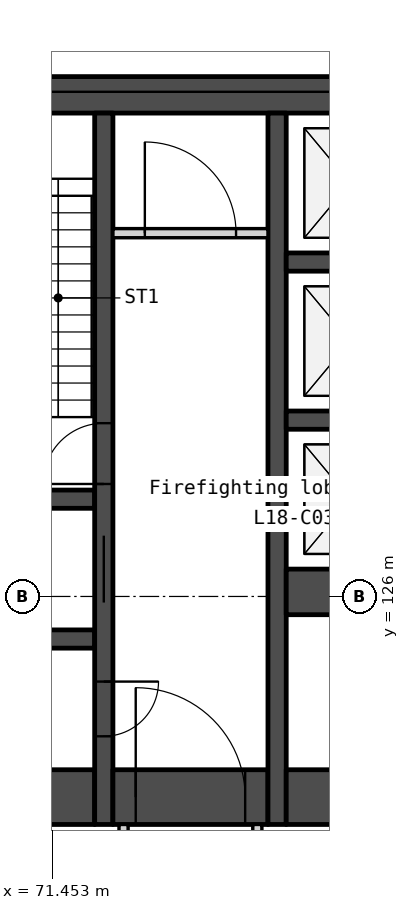
"""IFC4 building model, lengths in metres.
Left out: names, types, materials, properties, quantities, classifications, styles, units other than length and angle.
Written with IfcOpenShell. Run it as: python <this file> out.ifc"""

import sys

from ifc_helpers import new_model, si_unit, direction, frame, frame_2d, origin, place, context, subcontext, project, spatial, rectangle, extrude, element, fill, save


model = new_model("IFC4")
c1 = context("Model", 3, precision=1e-05, world=origin(), true_north=direction((0.0, 1.0)))
c2 = subcontext(c1, "Body", "Model", "MODEL_VIEW")
j1 = project(units=[si_unit("LENGTHUNIT", "METRE"), si_unit("PLANEANGLEUNIT", "RADIAN")], contexts=[c1])
p1 = place(None, origin())
s1 = spatial("IfcSite", under=j1, at=p1, CompositionType="ELEMENT")
p2 = place(p1, origin())
s2 = spatial("IfcBuilding", under=s1, at=p2, CompositionType="ELEMENT")
p3 = place(p2, frame((0.0, 0.0, 77.0)))
s3 = spatial("IfcBuildingStorey", under=s2, at=p3, CompositionType="ELEMENT", Elevation=77.0)
p4 = place(p3, frame((66.0, 134.25, 0.0), z_axis=(0.0, 0.0, 1.0), x_axis=(1.0, 0.0, 0.0)))
e1 = element("IfcWall", 1, at=p4, inside=s3, PredefinedType="SOLIDWALL", context=c2, shape_type="SweptSolid", body=[
    extrude(rectangle(XDim=28.0, YDim=0.6, at=frame_2d((14.0, 0.0))), origin(), (0.0, 0.0, 1.0), 4.35),
])
for number, where, z_axis, x_axis in (
    (2, (69.6, 127.6, 0.0), (0.0, 0.0, 1.0), (1.0, 0.0, 0.0)),
    (3, (69.6, 125.3, 0.0), (0.0, 0.0, 1.0), (1.0, 0.0, 0.0)),
):
    element("IfcWall", number, at=place(p3, frame(where, z_axis=z_axis, x_axis=x_axis)), inside=s3, PredefinedType="SOLIDWALL", context=c2, shape_type="SweptSolid", body=[
        extrude(rectangle(XDim=2.55, YDim=0.3, at=frame_2d((1.275, 0.0))), origin(), (0.0, 0.0, 1.0), 4.35),
    ])
p5 = place(p3, frame((69.6, 122.7, 0.0), z_axis=(0.0, 0.0, 1.0), x_axis=(1.0, 0.0, 0.0)))
e4 = element("IfcWall", 4, at=p5, inside=s3, PredefinedType="SOLIDWALL", context=c2, shape_type="SweptSolid", body=[
    extrude(rectangle(XDim=2.55, YDim=0.9, at=frame_2d((1.275, 0.0))), origin(), (0.0, 0.0, 1.0), 4.35),
])
p6 = place(p3, frame((72.3, 133.95, 0.0), z_axis=(0.0, 0.0, 1.0), x_axis=(0.0, -1.0, 0.0)))
e5 = element("IfcWall", 5, at=p6, inside=s3, PredefinedType="SOLIDWALL", context=c2, shape_type="SweptSolid", body=[
    extrude(rectangle(XDim=11.7, YDim=0.3, at=frame_2d((5.85, 0.0))), origin(), (0.0, 0.0, 1.0), 4.35),
])
p7 = place(p6, frame((6.95, 0.0, 0.0)))
e6 = element("IfcOpeningElement", 6, at=p7, cuts=e5, PredefinedType="OPENING", context=c2, shape_type="SweptSolid", body=[
    extrude(rectangle(XDim=1.1, YDim=2.1, at=frame_2d((0.55, 1.05))), frame((0.0, 0.16, 0.0), z_axis=(0.0, -1.0, 0.0), x_axis=(1.0, 0.0, 0.0)), (0.0, 0.0, 1.0), 0.32),
])
p8 = place(p6, frame((9.35, 0.0, 0.0)))
e7 = element("IfcOpeningElement", 7, at=p8, cuts=e5, PredefinedType="OPENING", context=c2, shape_type="SweptSolid", body=[
    extrude(rectangle(XDim=0.9, YDim=2.1, at=frame_2d((0.45, 1.05))), frame((0.0, 0.16, 0.0), z_axis=(0.0, -1.0, 0.0), x_axis=(1.0, 0.0, 0.0)), (0.0, 0.0, 1.0), 0.32),
])
p9 = place(p6, frame((5.1, 0.0, 0.0)))
e8 = element("IfcOpeningElement", 8, at=p9, cuts=e5, PredefinedType="OPENING", context=c2, shape_type="SweptSolid", body=[
    extrude(rectangle(XDim=1.0, YDim=2.1, at=frame_2d((0.5, 1.05))), frame((0.0, 0.16, 0.0), z_axis=(0.0, -1.0, 0.0), x_axis=(1.0, 0.0, 0.0)), (0.0, 0.0, 1.0), 0.32),
])
p10 = place(p3, frame((72.45, 131.975, 0.0), z_axis=(0.0, 0.0, 1.0), x_axis=(1.0, 0.0, 0.0)))
e9 = element("IfcWall", 9, at=p10, inside=s3, PredefinedType="PARTITIONING", context=c2, shape_type="SweptSolid", body=[
    extrude(rectangle(XDim=2.55, YDim=0.15, at=frame_2d((1.275, 0.0))), origin(), (0.0, 0.0, 1.0), 4.35),
])
p11 = place(p10, frame((0.525, 0.0, 0.0)))
e10 = element("IfcOpeningElement", 10, at=p11, cuts=e9, PredefinedType="OPENING", context=c2, shape_type="SweptSolid", body=[
    extrude(rectangle(XDim=1.5, YDim=2.1, at=frame_2d((0.75, 1.05))), frame((0.0, 0.085, 0.0), z_axis=(0.0, -1.0, 0.0), x_axis=(1.0, 0.0, 0.0)), (0.0, 0.0, 1.0), 0.17),
])
p12 = place(p3, frame((72.45, 122.7, 0.0), z_axis=(0.0, 0.0, 1.0), x_axis=(1.0, 0.0, 0.0)))
e11 = element("IfcWall", 11, at=p12, inside=s3, PredefinedType="SOLIDWALL", context=c2, shape_type="SweptSolid", body=[
    extrude(rectangle(XDim=2.55, YDim=0.9, at=frame_2d((1.275, 0.0))), origin(), (0.0, 0.0, 1.0), 4.35),
])
p13 = place(p12, frame((0.375, 0.0, 0.0)))
e12 = element("IfcOpeningElement", 12, at=p13, cuts=e11, PredefinedType="OPENING", context=c2, shape_type="SweptSolid", body=[
    extrude(rectangle(XDim=1.8, YDim=2.1, at=frame_2d((0.9, 1.05))), frame((0.0, 0.46, 0.0), z_axis=(0.0, -1.0, 0.0), x_axis=(1.0, 0.0, 0.0)), (0.0, 0.0, 1.0), 0.92),
])
for number, where, z_axis, x_axis in (
    (13, (72.625, 122.25, 0.0), (0.0, 0.0, 1.0), (0.0, -1.0, 0.0)),
    (14, (74.825, 122.25, 0.0), (0.0, 0.0, 1.0), (0.0, -1.0, 0.0)),
):
    element("IfcWall", number, at=place(p3, frame(where, z_axis=z_axis, x_axis=x_axis)), inside=s3, PredefinedType="PARTITIONING", context=c2, shape_type="SweptSolid", body=[
        extrude(rectangle(XDim=2.1, YDim=0.15, at=frame_2d((1.05, 0.0))), origin(), (0.0, 0.0, 1.0), 4.35),
    ])
p14 = place(p3, frame((75.15, 133.95, 0.0), z_axis=(0.0, 0.0, 1.0), x_axis=(0.0, -1.0, 0.0)))
e15 = element("IfcWall", 15, at=p14, inside=s3, PredefinedType="SOLIDWALL", context=c2, shape_type="SweptSolid", body=[
    extrude(rectangle(XDim=11.7, YDim=0.3, at=frame_2d((5.85, 0.0))), origin(), (0.0, 0.0, 1.0), 4.35),
])
for number, where, z_axis, x_axis in (
    (16, (75.3, 131.5, 0.0), (0.0, 0.0, 1.0), (1.0, 0.0, 0.0)),
    (17, (75.3, 128.9, 0.0), (0.0, 0.0, 1.0), (1.0, 0.0, 0.0)),
):
    element("IfcWall", number, at=place(p3, frame(where, z_axis=z_axis, x_axis=x_axis)), inside=s3, PredefinedType="SOLIDWALL", context=c2, shape_type="SweptSolid", body=[
        extrude(rectangle(XDim=2.1, YDim=0.3, at=frame_2d((1.05, 0.0))), origin(), (0.0, 0.0, 1.0), 4.35),
    ])
p15 = place(p3, frame((75.3, 126.075, 0.0), z_axis=(0.0, 0.0, 1.0), x_axis=(1.0, 0.0, 0.0)))
e18 = element("IfcWall", 18, at=p15, inside=s3, PredefinedType="SOLIDWALL", context=c2, shape_type="SweptSolid", body=[
    extrude(rectangle(XDim=2.1, YDim=0.75, at=frame_2d((1.05, 0.0))), origin(), (0.0, 0.0, 1.0), 4.35),
])
p16 = place(p3, frame((75.3, 122.7, 0.0), z_axis=(0.0, 0.0, 1.0), x_axis=(1.0, 0.0, 0.0)))
e19 = element("IfcWall", 19, at=p16, inside=s3, PredefinedType="SOLIDWALL", context=c2, shape_type="SweptSolid", body=[
    extrude(rectangle(XDim=6.2, YDim=0.9, at=frame_2d((3.1, 0.0))), origin(), (0.0, 0.0, 1.0), 4.35),
])
p17 = place(p7, origin())
e20 = element("IfcDoor", 20, at=p17, inside=s3, OperationType="SLIDING_TO_LEFT", PredefinedType="DOOR", context=c2, shape_type="SweptSolid", body=[
    extrude(rectangle(XDim=1.1, YDim=2.1, at=frame_2d((0.55, 1.05))), frame((0.0, 0.025, 0.0), z_axis=(0.0, -1.0, 0.0), x_axis=(1.0, 0.0, 0.0)), (0.0, 0.0, 1.0), 0.05),
])
fill(e6, e20)
p18 = place(p13, origin())
e21 = element("IfcDoor", 21, at=p18, inside=s3, OperationType="DOUBLE_DOOR_DOUBLE_SWING", PredefinedType="DOOR", context=c2, shape_type="SweptSolid", body=[
    extrude(rectangle(XDim=1.8, YDim=2.1, at=frame_2d((0.9, 1.05))), frame((0.0, 0.025, 0.0), z_axis=(0.0, -1.0, 0.0), x_axis=(1.0, 0.0, 0.0)), (0.0, 0.0, 1.0), 0.05),
])
fill(e12, e21)
p19 = place(p11, origin())
e22 = element("IfcDoor", 22, at=p19, inside=s3, OperationType="DOUBLE_DOOR_DOUBLE_SWING", PredefinedType="DOOR", context=c2, shape_type="SweptSolid", body=[
    extrude(rectangle(XDim=1.5, YDim=2.1, at=frame_2d((0.75, 1.05))), frame((0.0, 0.025, 0.0), z_axis=(0.0, -1.0, 0.0), x_axis=(1.0, 0.0, 0.0)), (0.0, 0.0, 1.0), 0.05),
])
fill(e10, e22)
p20 = place(p8, origin())
e23 = element("IfcDoor", 23, at=p20, inside=s3, OperationType="SINGLE_SWING_LEFT", PredefinedType="DOOR", context=c2, shape_type="SweptSolid", body=[
    extrude(rectangle(XDim=0.9, YDim=2.1, at=frame_2d((0.45, 1.05))), frame((0.0, 0.025, 0.0), z_axis=(0.0, -1.0, 0.0), x_axis=(1.0, 0.0, 0.0)), (0.0, 0.0, 1.0), 0.05),
])
fill(e7, e23)
p21 = place(p9, origin())
e24 = element("IfcDoor", 24, at=p21, inside=s3, OperationType="SINGLE_SWING_RIGHT", PredefinedType="DOOR", context=c2, shape_type="SweptSolid", body=[
    extrude(rectangle(XDim=1.0, YDim=2.1, at=frame_2d((0.5, 1.05))), frame((0.0, 0.025, 0.0), z_axis=(0.0, -1.0, 0.0), x_axis=(1.0, 0.0, 0.0)), (0.0, 0.0, 1.0), 0.05),
])
fill(e8, e24)
save(model, sys.argv[1])
